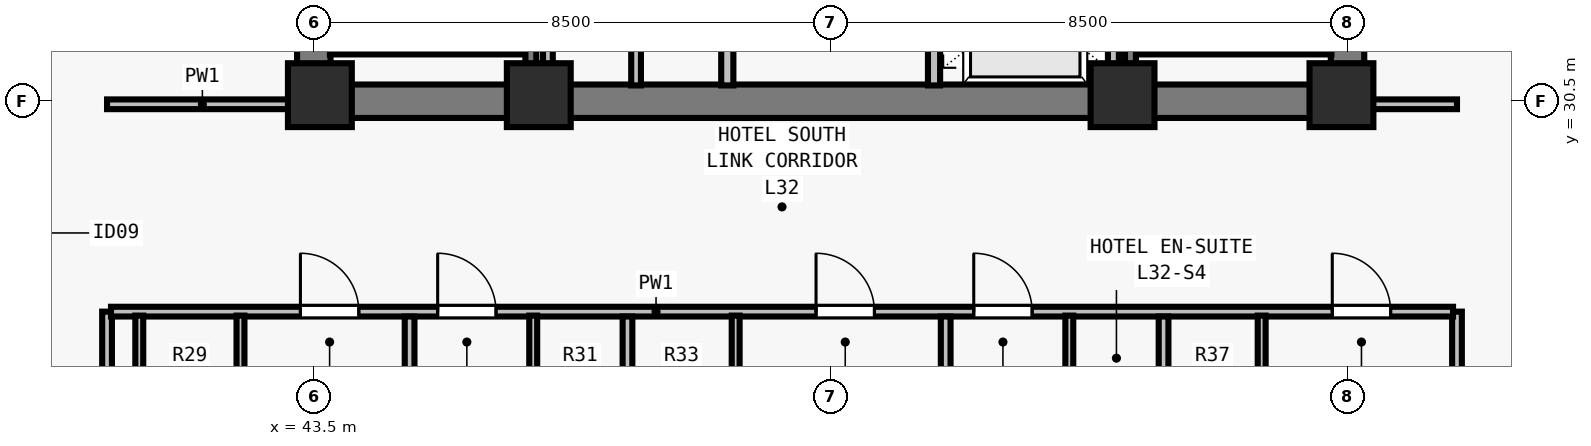
"""IFC4 building model, lengths in metres.
Left out: names, types, materials, properties, quantities, classifications, styles, units other than length and angle.
Written with IfcOpenShell. Run it as: python <this file> out.ifc"""

import sys

from ifc_helpers import new_model, si_unit, direction, frame, frame_2d, origin, origin_2d, place, context, subcontext, project, spatial, rectangle, extrude, element, fill, save


model = new_model("IFC4")
c1 = context("Model", 3, precision=1e-05, world=origin(), true_north=direction((0.0, 1.0)))
c2 = subcontext(c1, "Body", "Model", "MODEL_VIEW")
j1 = project(units=[si_unit("LENGTHUNIT", "METRE"), si_unit("PLANEANGLEUNIT", "RADIAN")], contexts=[c1])
p1 = place(None, origin())
s1 = spatial("IfcSite", under=j1, at=p1, CompositionType="ELEMENT")
p2 = place(p1, origin())
s2 = spatial("IfcBuilding", under=s1, at=p2, CompositionType="ELEMENT")
p3 = place(p2, frame((0.0, 0.0, 120.0)))
s3 = spatial("IfcBuildingStorey", under=s2, at=p3, CompositionType="ELEMENT", Elevation=120.0)
for number, where, z_axis, x_axis in (
    (1, (43.6, 30.6, 0.0), (0.0, 0.0, 1.0), (1.0, 0.0, 0.0)),
    (2, (47.2, 30.6, 0.0), (0.0, 0.0, 1.0), (1.0, 0.0, 0.0)),
    (3, (56.8, 30.6, 0.0), (0.0, 0.0, 1.0), (1.0, 0.0, 0.0)),
    (4, (60.4, 30.6, 0.0), (0.0, 0.0, 1.0), (1.0, 0.0, 0.0)),
):
    element("IfcColumn", number, at=place(p3, frame(where, z_axis=z_axis, x_axis=x_axis)), inside=s3, PredefinedType="COLUMN", context=c2, shape_type="SweptSolid", body=[
        extrude(rectangle(XDim=1.05, YDim=1.05, at=origin_2d()), origin(), (0.0, 0.0, 1.0), 3.5),
    ])
p4 = place(p3, frame((43.225, 30.5, 0.0), z_axis=(0.0, 0.0, 1.0), x_axis=(1.0, 0.0, 0.0)))
e5 = element("IfcWall", 5, at=p4, inside=s3, PredefinedType="SHEAR", context=c2, shape_type="SweptSolid", body=[
    extrude(rectangle(XDim=17.55, YDim=0.55, at=frame_2d((8.775, 0.0))), origin(), (0.0, 0.0, 1.0), 3.28),
])
for number, where, z_axis, x_axis in (
    (6, (43.5, 30.765, 0.0), (0.0, 0.0, 1.0), (0.0, 1.0, 0.0)),
    (7, (60.5, 30.765, 0.0), (0.0, 0.0, 1.0), (0.0, 1.0, 0.0)),
):
    element("IfcWall", number, at=place(p3, frame(where, z_axis=z_axis, x_axis=x_axis)), inside=s3, PredefinedType="SHEAR", context=c2, shape_type="SweptSolid", body=[
        extrude(rectangle(XDim=7.985, YDim=0.55, at=frame_2d((3.993, 0.0))), origin(), (0.0, 0.0, 1.0), 3.28),
    ])
p5 = place(p3, frame((50.3, 30.76, 0.0), z_axis=(0.0, 0.0, 1.0), x_axis=(0.0, 1.0, 0.0)))
e8 = element("IfcWall", 8, at=p5, inside=s3, PredefinedType="SOLIDWALL", context=c2, shape_type="SweptSolid", body=[
    extrude(rectangle(XDim=7.855, YDim=0.2, at=frame_2d((3.927, 0.0))), origin(), (0.0, 0.0, 1.0), 3.28),
])
p6 = place(p5, frame((2.09, 0.0, 0.0)))
e9 = element("IfcOpeningElement", 9, at=p6, cuts=e8, PredefinedType="OPENING", context=c2, shape_type="SweptSolid", body=[
    extrude(rectangle(XDim=0.95, YDim=2.12, at=frame_2d((0.475, 1.06))), frame((0.0, 0.11, 0.0), z_axis=(0.0, -1.0, 0.0), x_axis=(1.0, 0.0, 0.0)), (0.0, 0.0, 1.0), 0.22),
])
p7 = place(p3, frame((53.7, 30.76, 0.0), z_axis=(0.0, 0.0, 1.0), x_axis=(0.0, 1.0, 0.0)))
e10 = element("IfcWall", 10, at=p7, inside=s3, PredefinedType="SOLIDWALL", context=c2, shape_type="SweptSolid", body=[
    extrude(rectangle(XDim=7.855, YDim=0.2, at=frame_2d((3.927, 0.0))), origin(), (0.0, 0.0, 1.0), 3.28),
])
p8 = place(p7, frame((0.79, 0.0, 0.0)))
e11 = element("IfcOpeningElement", 11, at=p8, cuts=e10, PredefinedType="OPENING", context=c2, shape_type="SweptSolid", body=[
    extrude(rectangle(XDim=1.1, YDim=2.2, at=frame_2d((0.55, 1.1))), frame((0.0, 0.11, 0.0), z_axis=(0.0, -1.0, 0.0), x_axis=(1.0, 0.0, 0.0)), (0.0, 0.0, 1.0), 0.22),
])
p9 = place(p7, frame((3.49, 0.0, 0.0)))
e12 = element("IfcOpeningElement", 12, at=p9, cuts=e10, PredefinedType="OPENING", context=c2, shape_type="SweptSolid", body=[
    extrude(rectangle(XDim=1.1, YDim=2.2, at=frame_2d((0.55, 1.1))), frame((0.0, 0.11, 0.0), z_axis=(0.0, -1.0, 0.0), x_axis=(1.0, 0.0, 0.0)), (0.0, 0.0, 1.0), 0.22),
])
p10 = place(p7, frame((6.19, 0.0, 0.0)))
e13 = element("IfcOpeningElement", 13, at=p10, cuts=e10, PredefinedType="OPENING", context=c2, shape_type="SweptSolid", body=[
    extrude(rectangle(XDim=1.1, YDim=2.2, at=frame_2d((0.55, 1.1))), frame((0.0, 0.11, 0.0), z_axis=(0.0, -1.0, 0.0), x_axis=(1.0, 0.0, 0.0)), (0.0, 0.0, 1.0), 0.22),
])
p11 = place(p3, frame((47.35, 30.76, 0.0), z_axis=(0.0, 0.0, 1.0), x_axis=(0.0, 1.0, 0.0)))
e14 = element("IfcWall", 14, at=p11, inside=s3, PredefinedType="PARTITIONING", context=c2, shape_type="SweptSolid", body=[
    extrude(rectangle(XDim=7.855, YDim=0.16, at=frame_2d((3.927, 0.0))), origin(), (0.0, 0.0, 1.0), 3.28),
])
p12 = place(p3, frame((48.8, 30.76, 0.0), z_axis=(0.0, 0.0, 1.0), x_axis=(0.0, 1.0, 0.0)))
e15 = element("IfcWall", 15, at=p12, inside=s3, PredefinedType="PARTITIONING", context=c2, shape_type="SweptSolid", body=[
    extrude(rectangle(XDim=7.855, YDim=0.16, at=frame_2d((3.927, 0.0))), origin(), (0.0, 0.0, 1.0), 3.28),
])
p13 = place(p12, frame((3.49, 0.0, 0.0)))
e16 = element("IfcOpeningElement", 16, at=p13, cuts=e15, PredefinedType="OPENING", context=c2, shape_type="SweptSolid", body=[
    extrude(rectangle(XDim=0.85, YDim=2.12, at=frame_2d((0.425, 1.06))), frame((0.0, 0.09, 0.0), z_axis=(0.0, -1.0, 0.0), x_axis=(1.0, 0.0, 0.0)), (0.0, 0.0, 1.0), 0.18),
])
p14 = place(p3, frame((56.65, 30.76, 0.0), z_axis=(0.0, 0.0, 1.0), x_axis=(0.0, 1.0, 0.0)))
e17 = element("IfcWall", 17, at=p14, inside=s3, PredefinedType="SOLIDWALL", context=c2, shape_type="SweptSolid", body=[
    extrude(rectangle(XDim=7.855, YDim=0.18, at=frame_2d((3.927, 0.0))), origin(), (0.0, 0.0, 1.0), 3.28),
])
p15 = place(p3, frame((40.1, 15.325, 0.0), z_axis=(0.0, 0.0, 1.0), x_axis=(0.0, 1.0, 0.0)))
e18 = element("IfcWall", 18, at=p15, inside=s3, PredefinedType="PARTITIONING", context=c2, shape_type="SweptSolid", body=[
    extrude(rectangle(XDim=11.715, YDim=0.16, at=frame_2d((5.857, 0.0))), origin(), (0.0, 0.0, 1.0), 2.555),
])
p16 = place(p3, frame((40.1, 30.45, 0.0), z_axis=(0.0, 0.0, 1.0), x_axis=(1.0, 0.0, 0.0)))
e19 = element("IfcWall", 19, at=p16, inside=s3, PredefinedType="PARTITIONING", context=c2, shape_type="SweptSolid", body=[
    extrude(rectangle(XDim=3.135, YDim=0.16, at=frame_2d((1.567, 0.0))), origin(), (0.0, 0.0, 1.0), 3.28),
])
p17 = place(p3, frame((62.3, 15.325, 0.0), z_axis=(0.0, 0.0, 1.0), x_axis=(0.0, 1.0, 0.0)))
e20 = element("IfcWall", 20, at=p17, inside=s3, PredefinedType="PARTITIONING", context=c2, shape_type="SweptSolid", body=[
    extrude(rectangle(XDim=11.715, YDim=0.16, at=frame_2d((5.857, 0.0))), origin(), (0.0, 0.0, 1.0), 3.28),
])
p18 = place(p3, frame((60.765, 30.45, 0.0), z_axis=(0.0, 0.0, 1.0), x_axis=(1.0, 0.0, 0.0)))
e21 = element("IfcWall", 21, at=p18, inside=s3, PredefinedType="PARTITIONING", context=c2, shape_type="SweptSolid", body=[
    extrude(rectangle(XDim=1.535, YDim=0.16, at=frame_2d((0.768, 0.0))), origin(), (0.0, 0.0, 1.0), 3.28),
])
p19 = place(p3, frame((40.165, 27.04, 0.0), z_axis=(0.0, 0.0, 1.0), x_axis=(1.0, 0.0, 0.0)))
e22 = element("IfcWall", 22, at=p19, inside=s3, PredefinedType="PARTITIONING", context=c2, shape_type="SweptSolid", body=[
    extrude(rectangle(XDim=22.07, YDim=0.16, at=frame_2d((11.035, 0.0))), origin(), (0.0, 0.0, 1.0), 3.28),
])
p20 = place(p19, frame((3.115, 0.0, 0.0)))
e23 = element("IfcOpeningElement", 23, at=p20, cuts=e22, PredefinedType="OPENING", context=c2, shape_type="SweptSolid", body=[
    extrude(rectangle(XDim=0.96, YDim=2.15, at=frame_2d((0.48, 1.075))), frame((0.0, 0.09, 0.0), z_axis=(0.0, -1.0, 0.0), x_axis=(1.0, 0.0, 0.0)), (0.0, 0.0, 1.0), 0.18),
])
p21 = place(p19, frame((5.372, 0.0, 0.0)))
e24 = element("IfcOpeningElement", 24, at=p21, cuts=e22, PredefinedType="OPENING", context=c2, shape_type="SweptSolid", body=[
    extrude(rectangle(XDim=0.96, YDim=2.15, at=frame_2d((0.48, 1.075))), frame((0.0, 0.09, 0.0), z_axis=(0.0, -1.0, 0.0), x_axis=(1.0, 0.0, 0.0)), (0.0, 0.0, 1.0), 0.18),
])
p22 = place(p19, frame((11.594, 0.0, 0.0)))
e25 = element("IfcOpeningElement", 25, at=p22, cuts=e22, PredefinedType="OPENING", context=c2, shape_type="SweptSolid", body=[
    extrude(rectangle(XDim=0.96, YDim=2.15, at=frame_2d((0.48, 1.075))), frame((0.0, 0.09, 0.0), z_axis=(0.0, -1.0, 0.0), x_axis=(1.0, 0.0, 0.0)), (0.0, 0.0, 1.0), 0.18),
])
p23 = place(p19, frame((14.188, 0.0, 0.0)))
e26 = element("IfcOpeningElement", 26, at=p23, cuts=e22, PredefinedType="OPENING", context=c2, shape_type="SweptSolid", body=[
    extrude(rectangle(XDim=0.96, YDim=2.15, at=frame_2d((0.48, 1.075))), frame((0.0, 0.09, 0.0), z_axis=(0.0, -1.0, 0.0), x_axis=(1.0, 0.0, 0.0)), (0.0, 0.0, 1.0), 0.18),
])
p24 = place(p19, frame((20.084, 0.0, 0.0)))
e27 = element("IfcOpeningElement", 27, at=p24, cuts=e22, PredefinedType="OPENING", context=c2, shape_type="SweptSolid", body=[
    extrude(rectangle(XDim=0.96, YDim=2.15, at=frame_2d((0.48, 1.075))), frame((0.0, 0.09, 0.0), z_axis=(0.0, -1.0, 0.0), x_axis=(1.0, 0.0, 0.0)), (0.0, 0.0, 1.0), 0.18),
])
p25 = place(p3, frame((40.63, 24.66, 0.0), z_axis=(0.0, 0.0, 1.0), x_axis=(0.0, 1.0, 0.0)))
e28 = element("IfcWall", 28, at=p25, inside=s3, PredefinedType="PLUMBINGWALL", context=c2, shape_type="SweptSolid", body=[
    extrude(rectangle(XDim=2.315, YDim=0.13, at=frame_2d((1.158, 0.0))), origin(), (0.0, 0.0, 1.0), 2.555),
])
p26 = place(p3, frame((42.294, 24.66, 0.0), z_axis=(0.0, 0.0, 1.0), x_axis=(0.0, 1.0, 0.0)))
e29 = element("IfcWall", 29, at=p26, inside=s3, PredefinedType="PLUMBINGWALL", context=c2, shape_type="SweptSolid", body=[
    extrude(rectangle(XDim=2.315, YDim=0.13, at=frame_2d((1.158, 0.0))), origin(), (0.0, 0.0, 1.0), 3.28),
])
p27 = place(p3, frame((45.075, 15.325, 0.0), z_axis=(0.0, 0.0, 1.0), x_axis=(0.0, 1.0, 0.0)))
e30 = element("IfcWall", 30, at=p27, inside=s3, PredefinedType="PARTITIONING", context=c2, shape_type="SweptSolid", body=[
    extrude(rectangle(XDim=11.635, YDim=0.16, at=frame_2d((5.817, 0.0))), origin(), (0.0, 0.0, 1.0), 3.28),
])
p28 = place(p3, frame((47.108, 24.66, 0.0), z_axis=(0.0, 0.0, 1.0), x_axis=(0.0, 1.0, 0.0)))
e31 = element("IfcWall", 31, at=p28, inside=s3, PredefinedType="PLUMBINGWALL", context=c2, shape_type="SweptSolid", body=[
    extrude(rectangle(XDim=2.315, YDim=0.13, at=frame_2d((1.158, 0.0))), origin(), (0.0, 0.0, 1.0), 2.555),
])
p29 = place(p3, frame((48.658, 15.325, 0.0), z_axis=(0.0, 0.0, 1.0), x_axis=(0.0, 1.0, 0.0)))
e32 = element("IfcWall", 32, at=p29, inside=s3, PredefinedType="PARTITIONING", context=c2, shape_type="SweptSolid", body=[
    extrude(rectangle(XDim=11.635, YDim=0.16, at=frame_2d((5.817, 0.0))), origin(), (0.0, 0.0, 1.0), 2.896),
])
p30 = place(p3, frame((50.438, 24.66, 0.0), z_axis=(0.0, 0.0, 1.0), x_axis=(0.0, 1.0, 0.0)))
e33 = element("IfcWall", 33, at=p30, inside=s3, PredefinedType="PLUMBINGWALL", context=c2, shape_type="SweptSolid", body=[
    extrude(rectangle(XDim=2.315, YDim=0.13, at=frame_2d((1.158, 0.0))), origin(), (0.0, 0.0, 1.0), 3.28),
])
p31 = place(p3, frame((53.892, 15.325, 0.0), z_axis=(0.0, 0.0, 1.0), x_axis=(0.0, 1.0, 0.0)))
e34 = element("IfcWall", 34, at=p31, inside=s3, PredefinedType="PARTITIONING", context=c2, shape_type="SweptSolid", body=[
    extrude(rectangle(XDim=11.635, YDim=0.16, at=frame_2d((5.817, 0.0))), origin(), (0.0, 0.0, 1.0), 2.896),
])
p32 = place(p3, frame((55.925, 24.66, 0.0), z_axis=(0.0, 0.0, 1.0), x_axis=(0.0, 1.0, 0.0)))
e35 = element("IfcWall", 35, at=p32, inside=s3, PredefinedType="PLUMBINGWALL", context=c2, shape_type="SweptSolid", body=[
    extrude(rectangle(XDim=2.315, YDim=0.13, at=frame_2d((1.158, 0.0))), origin(), (0.0, 0.0, 1.0), 3.28),
])
p33 = place(p3, frame((57.475, 15.325, 0.0), z_axis=(0.0, 0.0, 1.0), x_axis=(0.0, 1.0, 0.0)))
e36 = element("IfcWall", 36, at=p33, inside=s3, PredefinedType="PARTITIONING", context=c2, shape_type="SweptSolid", body=[
    extrude(rectangle(XDim=11.635, YDim=0.16, at=frame_2d((5.817, 0.0))), origin(), (0.0, 0.0, 1.0), 3.28),
])
p34 = place(p3, frame((59.088, 24.66, 0.0), z_axis=(0.0, 0.0, 1.0), x_axis=(0.0, 1.0, 0.0)))
e37 = element("IfcWall", 37, at=p34, inside=s3, PredefinedType="PLUMBINGWALL", context=c2, shape_type="SweptSolid", body=[
    extrude(rectangle(XDim=2.315, YDim=0.13, at=frame_2d((1.158, 0.0))), origin(), (0.0, 0.0, 1.0), 3.28),
])
p35 = place(p3, frame((43.765, 31.36, 0.0), z_axis=(0.0, 0.0, 1.0), x_axis=(1.0, 0.0, 0.0)))
e38 = element("IfcWall", 38, at=p35, inside=s3, PredefinedType="SOLIDWALL", context=c2, shape_type="SweptSolid", body=[
    extrude(rectangle(XDim=3.23, YDim=0.18, at=frame_2d((1.615, 0.0))), origin(), (0.0, 0.0, 1.0), 3.28),
])
p36 = place(p3, frame((47.07, 38.78, 0.0), z_axis=(0.0, 0.0, 1.0), x_axis=(0.0, -1.0, 0.0)))
e39 = element("IfcWall", 39, at=p36, inside=s3, PredefinedType="SOLIDWALL", context=c2, shape_type="SweptSolid", body=[
    extrude(rectangle(XDim=8.017, YDim=0.18, at=frame_2d((4.009, 0.0))), origin(), (0.0, 0.0, 1.0), 3.28),
])
p37 = place(p3, frame((57.005, 31.36, 0.0), z_axis=(0.0, 0.0, 1.0), x_axis=(1.0, 0.0, 0.0)))
e40 = element("IfcWall", 40, at=p37, inside=s3, PredefinedType="SOLIDWALL", context=c2, shape_type="SweptSolid", body=[
    extrude(rectangle(XDim=3.23, YDim=0.18, at=frame_2d((1.615, 0.0))), origin(), (0.0, 0.0, 1.0), 3.28),
])
p38 = place(p3, frame((56.93, 38.78, 0.0), z_axis=(0.0, 0.0, 1.0), x_axis=(0.0, -1.0, 0.0)))
e41 = element("IfcWall", 41, at=p38, inside=s3, PredefinedType="SOLIDWALL", context=c2, shape_type="SweptSolid", body=[
    extrude(rectangle(XDim=8.017, YDim=0.18, at=frame_2d((4.009, 0.0))), origin(), (0.0, 0.0, 1.0), 3.28),
])
p39 = place(p20, origin())
e42 = element("IfcDoor", 42, at=p39, inside=s3, OperationType="SINGLE_SWING_LEFT", PredefinedType="DOOR", context=c2, shape_type="SweptSolid", body=[
    extrude(rectangle(XDim=0.96, YDim=2.15, at=frame_2d((0.48, 1.075))), frame((0.0, 0.025, 0.0), z_axis=(0.0, -1.0, 0.0), x_axis=(1.0, 0.0, 0.0)), (0.0, 0.0, 1.0), 0.05),
])
fill(e23, e42)
p40 = place(p21, origin())
e43 = element("IfcDoor", 43, at=p40, inside=s3, OperationType="SINGLE_SWING_LEFT", PredefinedType="DOOR", context=c2, shape_type="SweptSolid", body=[
    extrude(rectangle(XDim=0.96, YDim=2.15, at=frame_2d((0.48, 1.075))), frame((0.0, 0.025, 0.0), z_axis=(0.0, -1.0, 0.0), x_axis=(1.0, 0.0, 0.0)), (0.0, 0.0, 1.0), 0.05),
])
fill(e24, e43)
p41 = place(p22, origin())
e44 = element("IfcDoor", 44, at=p41, inside=s3, OperationType="SINGLE_SWING_LEFT", PredefinedType="DOOR", context=c2, shape_type="SweptSolid", body=[
    extrude(rectangle(XDim=0.96, YDim=2.15, at=frame_2d((0.48, 1.075))), frame((0.0, 0.025, 0.0), z_axis=(0.0, -1.0, 0.0), x_axis=(1.0, 0.0, 0.0)), (0.0, 0.0, 1.0), 0.05),
])
fill(e25, e44)
p42 = place(p23, origin())
e45 = element("IfcDoor", 45, at=p42, inside=s3, OperationType="SINGLE_SWING_LEFT", PredefinedType="DOOR", context=c2, shape_type="SweptSolid", body=[
    extrude(rectangle(XDim=0.96, YDim=2.15, at=frame_2d((0.48, 1.075))), frame((0.0, 0.025, 0.0), z_axis=(0.0, -1.0, 0.0), x_axis=(1.0, 0.0, 0.0)), (0.0, 0.0, 1.0), 0.05),
])
fill(e26, e45)
p43 = place(p24, origin())
e46 = element("IfcDoor", 46, at=p43, inside=s3, OperationType="SINGLE_SWING_LEFT", PredefinedType="DOOR", context=c2, shape_type="SweptSolid", body=[
    extrude(rectangle(XDim=0.96, YDim=2.15, at=frame_2d((0.48, 1.075))), frame((0.0, 0.025, 0.0), z_axis=(0.0, -1.0, 0.0), x_axis=(1.0, 0.0, 0.0)), (0.0, 0.0, 1.0), 0.05),
])
fill(e27, e46)
save(model, sys.argv[1])
